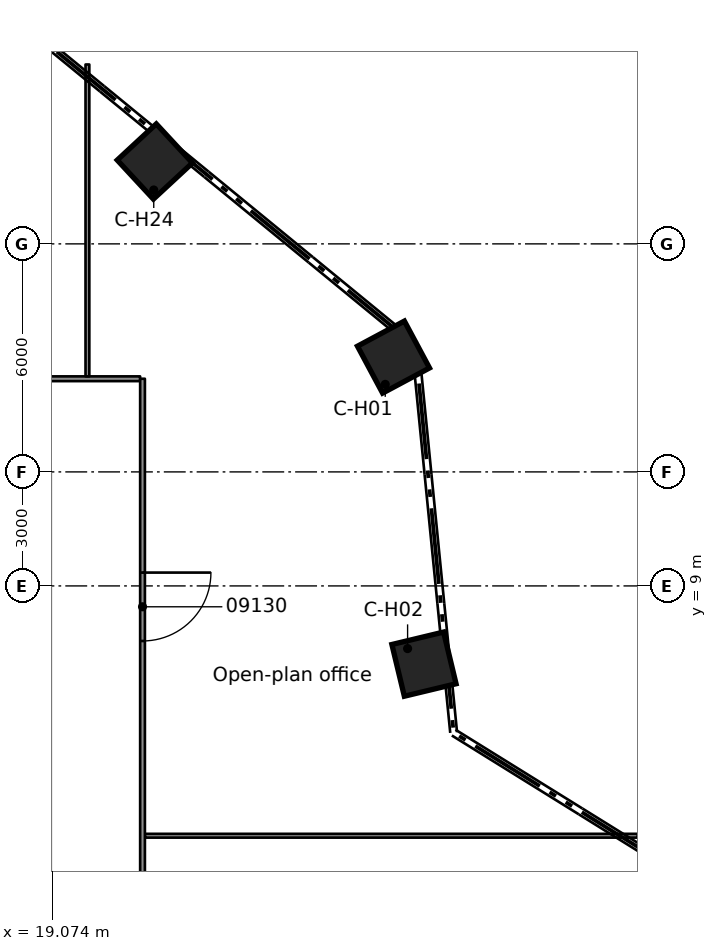
"""IFC4 building model, lengths in metres.
Left out: names, types, materials, properties, quantities, classifications, styles, units other than length and angle.
Written with IfcOpenShell. Run it as: python <this file> out.ifc"""

import sys

from ifc_helpers import new_model, si_unit, direction, frame, frame_2d, origin, origin_2d, place, context, subcontext, project, spatial, rectangle, extrude, element, fill, save


model = new_model("IFC4")
c1 = context("Model", 3, precision=1e-05, world=origin(), true_north=direction((0.0, 1.0)))
c2 = subcontext(c1, "Body", "Model", "MODEL_VIEW")
j1 = project(units=[si_unit("LENGTHUNIT", "METRE"), si_unit("PLANEANGLEUNIT", "RADIAN")], contexts=[c1])
p1 = place(None, origin())
s1 = spatial("IfcSite", under=j1, at=p1, CompositionType="ELEMENT")
p2 = place(p1, origin())
s2 = spatial("IfcBuilding", under=s1, at=p2, CompositionType="ELEMENT")
p3 = place(p2, frame((0.0, 0.0, 40.8)))
s3 = spatial("IfcBuildingStorey", under=s2, at=p3, CompositionType="ELEMENT", Elevation=40.8)
for number, where, z_axis, x_axis in (
    (1, (28.054, 15.021, 0.0), (0.0, 0.0, 1.0), (0.882, 0.472, 0.0)),
    (2, (28.856, 6.942, 0.0), (0.0, 0.0, 1.0), (0.972, 0.234, 0.0)),
    (3, (21.774, 20.167, 0.0), (0.0, 0.0, 1.0), (0.734, 0.68, 0.0)),
):
    element("IfcColumn", number, at=place(p3, frame(where, z_axis=z_axis, x_axis=x_axis)), inside=s3, PredefinedType="COLUMN", context=c2, shape_type="SweptSolid", body=[
        extrude(rectangle(XDim=1.4, YDim=1.4, at=origin_2d()), origin(), (0.0, 0.0, 1.0), 3.5),
    ])
p4 = place(p3, frame((21.512, 2.427, 0.0), z_axis=(0.0, 0.0, 1.0), x_axis=(1.0, 0.0, 0.0)))
e4 = element("IfcWall", 4, at=p4, inside=s3, PredefinedType="PARTITIONING", context=c2, shape_type="SweptSolid", body=[
    extrude(rectangle(XDim=12.97, YDim=0.1, at=frame_2d((6.485, 0.0))), origin(), (0.0, 0.0, 1.0), 3.06),
])
p5 = place(p3, frame((10.391, 14.451, 0.0), z_axis=(0.0, 0.0, 1.0), x_axis=(1.0, 0.0, 0.0)))
e5 = element("IfcWall", 5, at=p5, inside=s3, PredefinedType="PARTITIONING", context=c2, shape_type="SweptSolid", body=[
    extrude(rectangle(XDim=10.996, YDim=0.125, at=frame_2d((5.498, 0.0))), origin(), (0.0, 0.0, 1.0), 3.06),
])
p6 = place(p5, frame((3.85, 0.0, 0.0)))
e6 = element("IfcOpeningElement", 6, at=p6, cuts=e5, PredefinedType="OPENING", context=c2, shape_type="SweptSolid", body=[
    extrude(rectangle(XDim=1.8, YDim=2.1, at=frame_2d((0.9, 1.05))), frame((0.0, 0.073, 0.0), z_axis=(0.0, -1.0, 0.0), x_axis=(1.0, 0.0, 0.0)), (0.0, 0.0, 1.0), 0.145),
])
p7 = place(p3, frame((21.45, 14.451, 0.0), z_axis=(0.0, 0.0, 1.0), x_axis=(0.0, -1.0, 0.0)))
e7 = element("IfcWall", 7, at=p7, inside=s3, PredefinedType="PARTITIONING", context=c2, shape_type="SweptSolid", body=[
    extrude(rectangle(XDim=24.045, YDim=0.125, at=frame_2d((12.022, 0.0))), origin(), (0.0, 0.0, 1.0), 3.06),
])
p8 = place(p7, frame((17.124, 0.0, 0.0)))
e8 = element("IfcOpeningElement", 8, at=p8, cuts=e7, PredefinedType="OPENING", context=c2, shape_type="SweptSolid", body=[
    extrude(rectangle(XDim=1.8, YDim=2.1, at=frame_2d((0.9, 1.05))), frame((0.0, 0.073, 0.0), z_axis=(0.0, -1.0, 0.0), x_axis=(1.0, 0.0, 0.0)), (0.0, 0.0, 1.0), 0.145),
])
p9 = place(p7, frame((5.1, 0.0, 0.0)))
e9 = element("IfcOpeningElement", 9, at=p9, cuts=e7, PredefinedType="OPENING", context=c2, shape_type="SweptSolid", body=[
    extrude(rectangle(XDim=1.8, YDim=2.1, at=frame_2d((0.9, 1.05))), frame((0.0, 0.073, 0.0), z_axis=(0.0, -1.0, 0.0), x_axis=(1.0, 0.0, 0.0)), (0.0, 0.0, 1.0), 0.145),
])
p10 = place(p3, frame((20.0, 14.514, 0.0), z_axis=(0.0, 0.0, 1.0), x_axis=(0.0, 1.0, 0.0)))
e10 = element("IfcWall", 10, at=p10, inside=s3, PredefinedType="PARTITIONING", context=c2, shape_type="SweptSolid", body=[
    extrude(rectangle(XDim=8.206, YDim=0.1, at=frame_2d((4.103, 0.0))), origin(), (0.0, 0.0, 1.0), 3.06),
])
p11 = place(p9, origin())
e11 = element("IfcDoor", 11, at=p11, inside=s3, OperationType="DOUBLE_DOOR_SINGLE_SWING", PredefinedType="DOOR", context=c2, shape_type="SweptSolid", body=[
    extrude(rectangle(XDim=1.8, YDim=2.1, at=frame_2d((0.9, 1.05))), frame((0.0, 0.025, 0.0), z_axis=(0.0, -1.0, 0.0), x_axis=(1.0, 0.0, 0.0)), (0.0, 0.0, 1.0), 0.05),
])
fill(e9, e11)
save(model, sys.argv[1])
